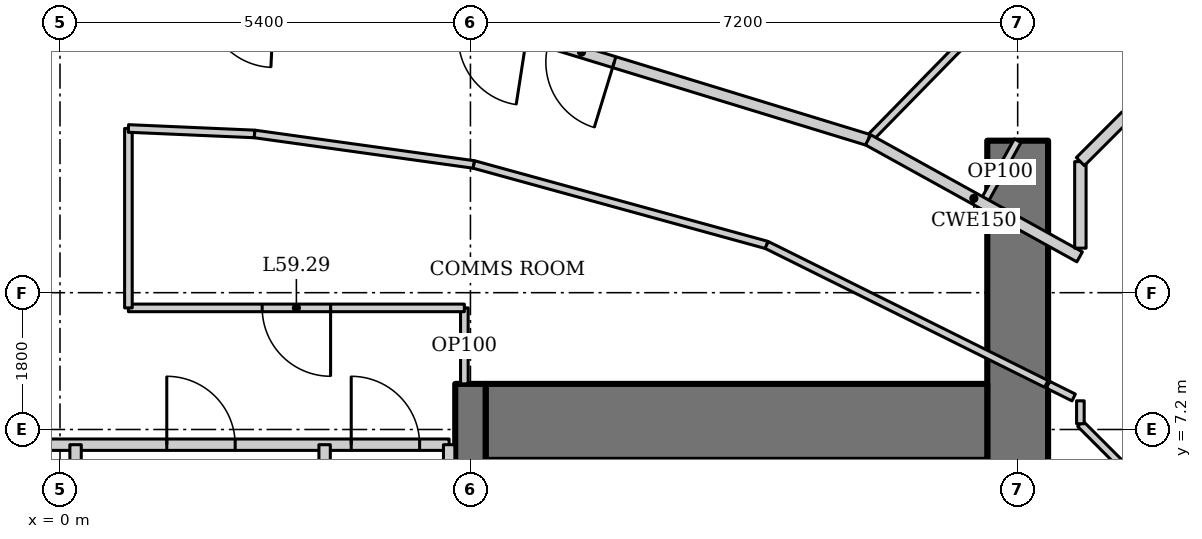
"""IFC4 building model, lengths in metres.
Left out: names, types, materials, properties, quantities, classifications, styles, units other than length and angle.
Written with IfcOpenShell. Run it as: python <this file> out.ifc"""

import sys

from ifc_helpers import new_model, si_unit, direction, frame, frame_2d, origin, place, context, subcontext, project, spatial, rectangle, extrude, element, fill, save


model = new_model("IFC4")
c1 = context("Model", 3, precision=1e-05, world=origin(), true_north=direction((0.0, 1.0)))
c2 = subcontext(c1, "Body", "Model", "MODEL_VIEW")
j1 = project(units=[si_unit("LENGTHUNIT", "METRE"), si_unit("PLANEANGLEUNIT", "RADIAN")], contexts=[c1])
p1 = place(None, origin())
s1 = spatial("IfcSite", under=j1, at=p1, CompositionType="ELEMENT")
p2 = place(p1, origin())
s2 = spatial("IfcBuilding", under=s1, at=p2, CompositionType="ELEMENT")
p3 = place(p2, frame((0.0, 0.0, 253.6)))
s3 = spatial("IfcBuildingStorey", under=s2, at=p3, CompositionType="ELEMENT", Elevation=253.6)
p4 = place(p3, frame((12.6, -11.0, 0.0), z_axis=(0.0, 0.0, 1.0), x_axis=(0.0, 1.0, 0.0)))
e1 = element("IfcWall", 1, at=p4, inside=s3, PredefinedType="SHEAR", context=c2, shape_type="SweptSolid", body=[
    extrude(rectangle(XDim=22.0, YDim=0.8, at=frame_2d((11.0, 0.0))), origin(), (0.0, 0.0, 1.0), 4.2),
])
p5 = place(p4, frame((10.1, 0.0, 0.0)))
e2 = element("IfcOpeningElement", 2, at=p5, cuts=e1, PredefinedType="OPENING", context=c2, shape_type="SweptSolid", body=[
    extrude(rectangle(XDim=1.8, YDim=2.1, at=frame_2d((0.9, 1.05))), frame((0.0, 0.41, 0.0), z_axis=(0.0, -1.0, 0.0), x_axis=(1.0, 0.0, 0.0)), (0.0, 0.0, 1.0), 0.82),
])
p6 = place(p3, frame((12.2, 7.3, 0.0), z_axis=(0.0, 0.0, 1.0), x_axis=(-1.0, 0.0, 0.0)))
e3 = element("IfcWall", 3, at=p6, inside=s3, PredefinedType="SHEAR", context=c2, shape_type="SweptSolid", body=[
    extrude(rectangle(XDim=6.6, YDim=1.0, at=frame_2d((3.3, 0.0))), origin(), (0.0, 0.0, 1.0), 4.2),
])
p7 = place(p3, frame((5.4, -6.8, 0.0), z_axis=(0.0, 0.0, 1.0), x_axis=(0.0, 1.0, 0.0)))
e4 = element("IfcWall", 4, at=p7, inside=s3, PredefinedType="SHEAR", context=c2, shape_type="SweptSolid", body=[
    extrude(rectangle(XDim=14.6, YDim=0.4, at=frame_2d((7.3, 0.0))), origin(), (0.0, 0.0, 1.0), 4.2),
])
p8 = place(p7, frame((5.9, 0.0, 0.0)))
e5 = element("IfcOpeningElement", 5, at=p8, cuts=e4, PredefinedType="OPENING", context=c2, shape_type="SweptSolid", body=[
    extrude(rectangle(XDim=1.8, YDim=2.1, at=frame_2d((0.9, 1.05))), frame((0.0, 0.21, 0.0), z_axis=(0.0, -1.0, 0.0), x_axis=(1.0, 0.0, 0.0)), (0.0, 0.0, 1.0), 0.42),
])
p9 = place(p3, frame((15.709, 16.199, 0.0), z_axis=(0.0, 0.0, 1.0), x_axis=(-0.699362525935, -0.714767135029, 0.0)))
e6 = element("IfcWall", 6, at=p9, inside=s3, PredefinedType="PARTITIONING", context=c2, shape_type="SweptSolid", body=[
    extrude(rectangle(XDim=7.259, YDim=0.1, at=frame_2d((3.629, 0.0))), origin(), (0.0, 0.0, 1.0), 3.41),
])
p10 = place(p3, frame((10.633, 11.01, 0.0), z_axis=(0.0, 0.0, 1.0), x_axis=(-0.956185837153, 0.292760388079, 0.0)))
e7 = element("IfcWall", 7, at=p10, inside=s3, PredefinedType="PARTITIONING", context=c2, shape_type="SweptSolid", body=[
    extrude(rectangle(XDim=4.544, YDim=0.15, at=frame_2d((2.272, 0.0))), origin(), (0.0, 0.0, 1.0), 4.05),
])
p11 = place(p10, frame((3.494, 0.0, 0.0)))
e8 = element("IfcOpeningElement", 8, at=p11, cuts=e7, PredefinedType="OPENING", context=c2, shape_type="SweptSolid", body=[
    extrude(rectangle(XDim=0.9, YDim=2.1, at=frame_2d((0.45, 1.05))), frame((0.0, 0.085, 0.0), z_axis=(0.0, -1.0, 0.0), x_axis=(1.0, 0.0, 0.0)), (0.0, 0.0, 1.0), 0.17),
])
p12 = place(p3, frame((-5.12, 7.0, 0.0), z_axis=(0.0, 0.0, 1.0), x_axis=(1.0, 0.0, 0.0)))
e9 = element("IfcWall", 9, at=p12, inside=s3, PredefinedType="SOLIDWALL", context=c2, shape_type="SweptSolid", body=[
    extrude(rectangle(XDim=10.24, YDim=0.15, at=frame_2d((5.12, 0.0))), origin(), (0.0, 0.0, 1.0), 4.05),
])
p13 = place(p12, frame((0.5, 0.0, 0.0)))
e10 = element("IfcOpeningElement", 10, at=p13, cuts=e9, PredefinedType="OPENING", context=c2, shape_type="SweptSolid", body=[
    extrude(rectangle(XDim=1.0, YDim=2.1, at=frame_2d((0.5, 1.05))), frame((0.0, 0.085, 0.0), z_axis=(0.0, -1.0, 0.0), x_axis=(1.0, 0.0, 0.0)), (0.0, 0.0, 1.0), 0.17),
])
p14 = place(p12, frame((3.248, 0.0, 0.0)))
e11 = element("IfcOpeningElement", 11, at=p14, cuts=e9, PredefinedType="OPENING", context=c2, shape_type="SweptSolid", body=[
    extrude(rectangle(XDim=0.9, YDim=2.1, at=frame_2d((0.45, 1.05))), frame((0.0, 0.085, 0.0), z_axis=(0.0, -1.0, 0.0), x_axis=(1.0, 0.0, 0.0)), (0.0, 0.0, 1.0), 0.17),
])
p15 = place(p12, frame((6.525, 0.0, 0.0)))
e12 = element("IfcOpeningElement", 12, at=p15, cuts=e9, PredefinedType="OPENING", context=c2, shape_type="SweptSolid", body=[
    extrude(rectangle(XDim=0.9, YDim=2.1, at=frame_2d((0.45, 1.05))), frame((0.0, 0.085, 0.0), z_axis=(0.0, -1.0, 0.0), x_axis=(1.0, 0.0, 0.0)), (0.0, 0.0, 1.0), 0.17),
])
p16 = place(p12, frame((8.952, 0.0, 0.0)))
e13 = element("IfcOpeningElement", 13, at=p16, cuts=e9, PredefinedType="OPENING", context=c2, shape_type="SweptSolid", body=[
    extrude(rectangle(XDim=0.9, YDim=2.1, at=frame_2d((0.45, 1.05))), frame((0.0, 0.085, 0.0), z_axis=(0.0, -1.0, 0.0), x_axis=(1.0, 0.0, 0.0)), (0.0, 0.0, 1.0), 0.17),
])
for number, where, z_axis, x_axis in (
    (14, (5.12, 2.6, 0.0), (0.0, 0.0, 1.0), (0.0, 1.0, 0.0)),
    (15, (0.205, 2.6, 0.0), (0.0, 0.0, 1.0), (0.0, 1.0, 0.0)),
    (16, (3.482, 2.6, 0.0), (0.0, 0.0, 1.0), (0.0, 1.0, 0.0)),
):
    element("IfcWall", number, at=place(p3, frame(where, z_axis=z_axis, x_axis=x_axis)), inside=s3, PredefinedType="SOLIDWALL", context=c2, shape_type="SweptSolid", body=[
        extrude(rectangle(XDim=4.4, YDim=0.15, at=frame_2d((2.2, 0.0))), origin(), (0.0, 0.0, 1.0), 4.05),
    ])
p17 = place(p3, frame((13.0, 7.788, 0.0), z_axis=(0.0, 0.0, 1.0), x_axis=(0.895721570004, -0.444615416995, 0.0)))
e17 = element("IfcWall", 17, at=p17, inside=s3, PredefinedType="PARTITIONING", context=c2, shape_type="SweptSolid", body=[
    extrude(rectangle(XDim=0.376, YDim=0.1, at=frame_2d((0.188, 0.0))), origin(), (0.0, 0.0, 1.0), 4.05),
])
p18 = place(p3, frame((5.32, 7.8, 0.0), z_axis=(0.0, 0.0, 1.0), x_axis=(0.0, 1.0, 0.0)))
e18 = element("IfcWall", 18, at=p18, inside=s3, PredefinedType="PARTITIONING", context=c2, shape_type="SweptSolid", body=[
    extrude(rectangle(XDim=1.0, YDim=0.1, at=frame_2d((0.5, 0.0))), origin(), (0.0, 0.0, 1.0), 4.05),
])
p19 = place(p3, frame((5.32, 8.8, 0.0), z_axis=(0.0, 0.0, 1.0), x_axis=(-1.0, 0.0, 0.0)))
e19 = element("IfcWall", 19, at=p19, inside=s3, PredefinedType="PARTITIONING", context=c2, shape_type="SweptSolid", body=[
    extrude(rectangle(XDim=4.42, YDim=0.1, at=frame_2d((2.21, 0.0))), origin(), (0.0, 0.0, 1.0), 4.05),
])
p20 = place(p19, frame((1.76, 0.0, 0.0)))
e20 = element("IfcOpeningElement", 20, at=p20, cuts=e19, PredefinedType="OPENING", context=c2, shape_type="SweptSolid", body=[
    extrude(rectangle(XDim=0.9, YDim=2.1, at=frame_2d((0.45, 1.05))), frame((0.0, 0.06, 0.0), z_axis=(0.0, -1.0, 0.0), x_axis=(1.0, 0.0, 0.0)), (0.0, 0.0, 1.0), 0.12),
])
p21 = place(p3, frame((0.9, 8.8, 0.0), z_axis=(0.0, 0.0, 1.0), x_axis=(0.0, 1.0, 0.0)))
e21 = element("IfcWall", 21, at=p21, inside=s3, PredefinedType="PARTITIONING", context=c2, shape_type="SweptSolid", body=[
    extrude(rectangle(XDim=2.361, YDim=0.1, at=frame_2d((1.18, 0.0))), origin(), (0.0, 0.0, 1.0), 4.05),
])
p22 = place(p3, frame((0.9, 11.161, 0.0), z_axis=(0.0, 0.0, 1.0), x_axis=(0.999053939397, -0.043488230303, 0.0)))
e22 = element("IfcWall", 22, at=p22, inside=s3, PredefinedType="PARTITIONING", context=c2, shape_type="SweptSolid", body=[
    extrude(rectangle(XDim=1.662, YDim=0.1, at=frame_2d((0.831, 0.0))), origin(), (0.0, 0.0, 1.0), 4.05),
])
p23 = place(p3, frame((2.56, 11.089, 0.0), z_axis=(0.0, 0.0, 1.0), x_axis=(0.99045099049, -0.137865280027, 0.0)))
e23 = element("IfcWall", 23, at=p23, inside=s3, PredefinedType="PARTITIONING", context=c2, shape_type="SweptSolid", body=[
    extrude(rectangle(XDim=2.913, YDim=0.1, at=frame_2d((1.457, 0.0))), origin(), (0.0, 0.0, 1.0), 4.05),
])
p24 = place(p3, frame((5.445, 10.687, 0.0), z_axis=(0.0, 0.0, 1.0), x_axis=(0.964244438722, -0.265014456954, 0.0)))
e24 = element("IfcWall", 24, at=p24, inside=s3, PredefinedType="PARTITIONING", context=c2, shape_type="SweptSolid", body=[
    extrude(rectangle(XDim=3.995, YDim=0.1, at=frame_2d((1.998, 0.0))), origin(), (0.0, 0.0, 1.0), 4.05),
])
p25 = place(p3, frame((9.298, 9.628, 0.0), z_axis=(0.0, 0.0, 1.0), x_axis=(0.895529831139, -0.445001484874, 0.0)))
e25 = element("IfcWall", 25, at=p25, inside=s3, PredefinedType="PARTITIONING", context=c2, shape_type="SweptSolid", body=[
    extrude(rectangle(XDim=4.108, YDim=0.1, at=frame_2d((2.054, 0.0))), origin(), (0.0, 0.0, 1.0), 4.05),
])
p26 = place(p3, frame((12.6, 11.0, 0.0), z_axis=(0.0, 0.0, 1.0), x_axis=(-0.484103558985, -0.875010710893, 0.0)))
e26 = element("IfcWall", 26, at=p26, inside=s3, PredefinedType="PARTITIONING", context=c2, shape_type="SweptSolid", body=[
    extrude(rectangle(XDim=0.943, YDim=0.1, at=frame_2d((0.472, 0.0))), origin(), (0.0, 0.0, 1.0), 4.05),
])
p27 = place(p3, frame((13.415, 9.472, 0.0), z_axis=(0.0, 0.0, 1.0), x_axis=(-0.875072100837, 0.483992580869, 0.0)))
e27 = element("IfcWall", 27, at=p27, inside=s3, PredefinedType="PARTITIONING", context=c2, shape_type="SweptSolid", body=[
    extrude(rectangle(XDim=3.179, YDim=0.15, at=frame_2d((1.59, 0.0))), origin(), (0.0, 0.0, 1.0), 4.05),
])
p28 = place(p3, frame((14.025, 6.675, 0.0), z_axis=(0.0, 0.0, 1.0), x_axis=(-0.707106781187, 0.707106781187, 0.0)))
e28 = element("IfcWall", 28, at=p28, inside=s3, PredefinedType="PARTITIONING", context=c2, shape_type="SweptSolid", body=[
    extrude(rectangle(XDim=0.849, YDim=0.1, at=frame_2d((0.425, 0.0))), origin(), (0.0, 0.0, 1.0), 4.05),
])
p29 = place(p3, frame((13.425, 7.275, 0.0), z_axis=(0.0, 0.0, 1.0), x_axis=(0.0, 1.0, 0.0)))
e29 = element("IfcWall", 29, at=p29, inside=s3, PredefinedType="PARTITIONING", context=c2, shape_type="SweptSolid", body=[
    extrude(rectangle(XDim=0.302, YDim=0.1, at=frame_2d((0.151, 0.0))), origin(), (0.0, 0.0, 1.0), 4.05),
])
p30 = place(p3, frame((13.425, 9.586, 0.0), z_axis=(0.0, 0.0, 1.0), x_axis=(0.0, 1.0, 0.0)))
e30 = element("IfcWall", 30, at=p30, inside=s3, PredefinedType="PARTITIONING", context=c2, shape_type="SweptSolid", body=[
    extrude(rectangle(XDim=1.138, YDim=0.15, at=frame_2d((0.569, 0.0))), origin(), (0.0, 0.0, 1.0), 4.05),
])
p31 = place(p3, frame((13.425, 10.725, 0.0), z_axis=(0.0, 0.0, 1.0), x_axis=(0.707106781187, 0.707106781187, 0.0)))
e31 = element("IfcWall", 31, at=p31, inside=s3, PredefinedType="PARTITIONING", context=c2, shape_type="SweptSolid", body=[
    extrude(rectangle(XDim=0.849, YDim=0.15, at=frame_2d((0.425, 0.0))), origin(), (0.0, 0.0, 1.0), 4.05),
])
p32 = place(p15, origin())
e32 = element("IfcDoor", 32, at=p32, inside=s3, OperationType="SINGLE_SWING_LEFT", PredefinedType="DOOR", context=c2, shape_type="SweptSolid", body=[
    extrude(rectangle(XDim=0.9, YDim=2.1, at=frame_2d((0.45, 1.05))), frame((0.0, 0.025, 0.0), z_axis=(0.0, -1.0, 0.0), x_axis=(1.0, 0.0, 0.0)), (0.0, 0.0, 1.0), 0.05),
])
fill(e12, e32)
p33 = place(p16, origin())
e33 = element("IfcDoor", 33, at=p33, inside=s3, OperationType="SINGLE_SWING_LEFT", PredefinedType="DOOR", context=c2, shape_type="SweptSolid", body=[
    extrude(rectangle(XDim=0.9, YDim=2.1, at=frame_2d((0.45, 1.05))), frame((0.0, 0.025, 0.0), z_axis=(0.0, -1.0, 0.0), x_axis=(1.0, 0.0, 0.0)), (0.0, 0.0, 1.0), 0.05),
])
fill(e13, e33)
p34 = place(p20, origin())
e34 = element("IfcDoor", 34, at=p34, inside=s3, OperationType="SINGLE_SWING_LEFT", PredefinedType="DOOR", context=c2, shape_type="SweptSolid", body=[
    extrude(rectangle(XDim=0.9, YDim=2.1, at=frame_2d((0.45, 1.05))), frame((0.0, 0.025, 0.0), z_axis=(0.0, -1.0, 0.0), x_axis=(1.0, 0.0, 0.0)), (0.0, 0.0, 1.0), 0.05),
])
fill(e20, e34)
p35 = place(p11, origin())
e35 = element("IfcDoor", 35, at=p35, inside=s3, OperationType="SINGLE_SWING_LEFT", PredefinedType="DOOR", context=c2, shape_type="SweptSolid", body=[
    extrude(rectangle(XDim=0.9, YDim=2.1, at=frame_2d((0.45, 1.05))), frame((0.0, 0.025, 0.0), z_axis=(0.0, -1.0, 0.0), x_axis=(1.0, 0.0, 0.0)), (0.0, 0.0, 1.0), 0.05),
])
fill(e8, e35)
save(model, sys.argv[1])
